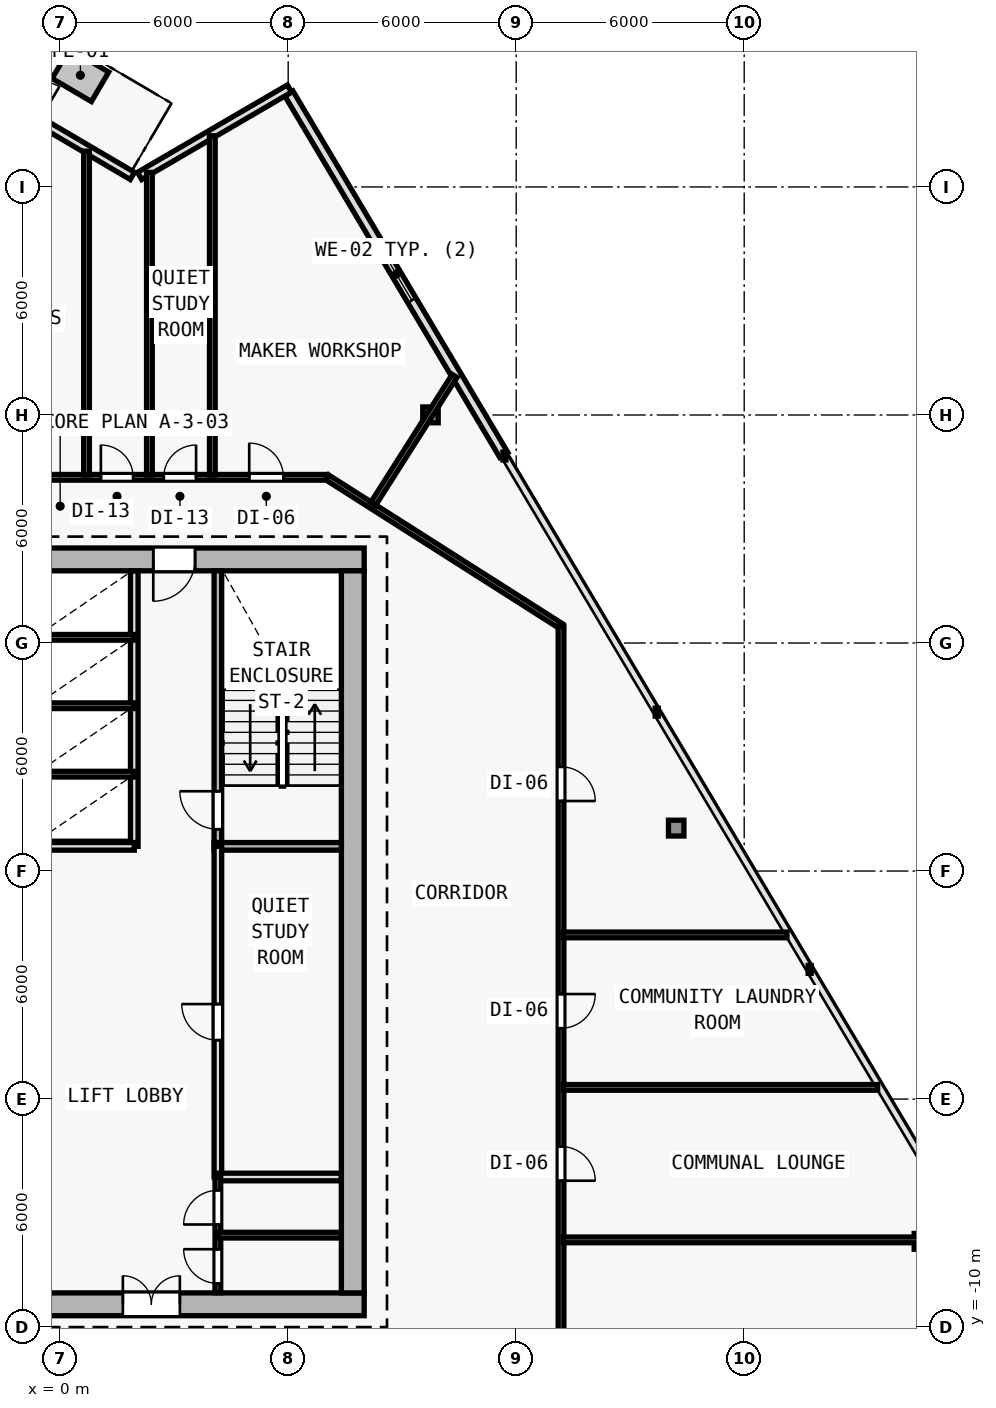
"""IFC4 building model, lengths in metres.
Left out: names, types, materials, properties, quantities, classifications, styles, units other than length and angle.
Written with IfcOpenShell. Run it as: python <this file> out.ifc"""

import sys

from ifc_helpers import new_model, si_unit, direction, frame, frame_2d, origin, origin_2d, place, context, subcontext, project, spatial, rectangle, i_section, extrude, element, fill, save


model = new_model("IFC4")
c1 = context("Model", 3, precision=1e-05, world=origin(), true_north=direction((0.0, 1.0)))
c2 = subcontext(c1, "Body", "Model", "MODEL_VIEW")
j1 = project(units=[si_unit("LENGTHUNIT", "METRE"), si_unit("PLANEANGLEUNIT", "RADIAN")], contexts=[c1])
p1 = place(None, origin())
s1 = spatial("IfcSite", under=j1, at=p1, CompositionType="ELEMENT")
p2 = place(p1, origin())
s2 = spatial("IfcBuilding", under=s1, at=p2, CompositionType="ELEMENT")
p3 = place(p2, frame((0.0, 0.0, 125.7)))
s3 = spatial("IfcBuildingStorey", under=s2, at=p3, CompositionType="ELEMENT", Elevation=125.7)
for number, where, z_axis, x_axis in (
    (1, (7.7, -9.4, 0.0), (0.0, 0.0, 1.0), (1.0, 0.0, 0.0)),
    (2, (7.7, 10.2, 0.0), (0.0, 0.0, 1.0), (1.0, 0.0, 0.0)),
    (3, (0.0, -9.4, 0.0), (0.0, 0.0, 1.0), (1.0, 0.0, 0.0)),
    (4, (7.7, 0.4, 0.0), (0.0, 0.0, 1.0), (1.0, 0.0, 0.0)),
):
    element("IfcColumn", number, at=place(p3, frame(where, z_axis=z_axis, x_axis=x_axis)), inside=s3, PredefinedType="COLUMN", context=c2, shape_type="SweptSolid", body=[
        extrude(i_section(OverallWidth=0.409, OverallDepth=0.425, WebThickness=0.021, FlangeThickness=0.034, FilletRadius=0.015, at=origin_2d()), origin(), (0.0, 0.0, 1.0), 3.6),
    ])
p4 = place(p3, frame((22.676, -7.743, 0.006), z_axis=(-0.026107436898, 0.021620221181, 0.999425318758), x_axis=(-0.637813971185, -0.770190455771, 0.0)))
e5 = element("IfcColumn", 5, at=p4, inside=s3, PredefinedType="COLUMN", context=c2, shape_type="SweptSolid", body=[
    extrude(i_section(OverallWidth=0.406, OverallDepth=0.416, WebThickness=0.019, FlangeThickness=0.031, FilletRadius=0.015, at=origin_2d()), origin(), (0.0, 0.0, 1.0), 3.591),
])
p5 = place(p3, frame((16.21, 3.13, 0.006), z_axis=(-0.018907326549, 0.00952167524, 0.999775900241), x_axis=(-0.449781931574, -0.893138406984, 0.0)))
e6 = element("IfcColumn", 6, at=p5, inside=s3, PredefinedType="COLUMN", context=c2, shape_type="SweptSolid", body=[
    extrude(i_section(OverallWidth=0.406, OverallDepth=0.416, WebThickness=0.019, FlangeThickness=0.031, FilletRadius=0.015, at=origin_2d()), origin(), (0.0, 0.0, 1.0), 3.59),
])
p6 = place(p3, frame((9.744, 14.003, 0.006), z_axis=(-0.011699842352, -0.002516826552, 0.999928387072), x_axis=(0.210305364179, -0.977635746993, 0.0)))
e7 = element("IfcColumn", 7, at=p6, inside=s3, PredefinedType="COLUMN", context=c2, shape_type="SweptSolid", body=[
    extrude(i_section(OverallWidth=0.406, OverallDepth=0.416, WebThickness=0.019, FlangeThickness=0.031, FilletRadius=0.015, at=origin_2d()), origin(), (0.0, 0.0, 1.0), 3.589),
])
p7 = place(p3, frame((6.017, 22.462, 0.0), z_axis=(0.0, 0.0, 1.0), x_axis=(0.511085523564, -0.859529864288, 0.0)))
e8 = element("IfcWall", 8, at=p7, inside=s3, PredefinedType="SOLIDWALL", context=c2, shape_type="SweptSolid", body=[
    extrude(rectangle(XDim=11.068, YDim=0.25, at=frame_2d((5.534, 0.0))), origin(), (0.0, 0.0, 1.0), 3.28),
])
p8 = place(p7, frame((4.734, 0.0, 0.62)))
e9 = element("IfcOpeningElement", 9, at=p8, cuts=e8, PredefinedType="OPENING", context=c2, shape_type="SweptSolid", body=[
    extrude(rectangle(XDim=1.6, YDim=2.1, at=frame_2d((0.8, 1.05))), frame((0.0, 0.135, 0.0), z_axis=(0.0, -1.0, 0.0), x_axis=(1.0, 0.0, 0.0)), (0.0, 0.0, 1.0), 0.27),
])
p9 = place(p3, frame((2.09, 20.291, 0.0), z_axis=(0.0, 0.0, 1.0), x_axis=(0.863978647835, 0.503528446153, 0.0)))
e10 = element("IfcWall", 10, at=p9, inside=s3, PredefinedType="SOLIDWALL", context=c2, shape_type="SweptSolid", body=[
    extrude(rectangle(XDim=4.564, YDim=0.22, at=frame_2d((2.282, 0.0))), origin(), (0.0, 0.0, 1.0), 3.28),
])
p10 = place(p3, frame((-2.447, 22.846, 0.0), z_axis=(0.0, 0.0, 1.0), x_axis=(0.8621357974, -0.506677280763, 0.0)))
e11 = element("IfcWall", 11, at=p10, inside=s3, PredefinedType="SOLIDWALL", context=c2, shape_type="SweptSolid", body=[
    extrude(rectangle(XDim=5.042, YDim=0.22, at=frame_2d((2.521, 0.0))), origin(), (0.0, 0.0, 1.0), 3.28),
])
p11 = place(p10, frame((1.146, 0.0, 0.0)))
e12 = element("IfcOpeningElement", 12, at=p11, cuts=e11, PredefinedType="OPENING", context=c2, shape_type="SweptSolid", body=[
    extrude(rectangle(XDim=1.05, YDim=2.15, at=frame_2d((0.525, 1.075))), frame((0.0, 0.12, 0.0), z_axis=(0.0, -1.0, 0.0), x_axis=(1.0, 0.0, 0.0)), (0.0, 0.0, 1.0), 0.24),
])
p12 = place(p3, frame((-8.0, -9.4, 0.0), z_axis=(0.0, 0.0, 1.0), x_axis=(1.0, 0.0, 0.0)))
e13 = element("IfcWall", 13, at=p12, inside=s3, PredefinedType="SHEAR", context=c2, shape_type="SweptSolid", body=[
    extrude(rectangle(XDim=16.0, YDim=0.6, at=frame_2d((8.0, 0.0))), origin(), (0.0, 0.0, 1.0), 3.28),
])
p13 = place(p12, frame((9.65, 0.0, 0.0)))
e14 = element("IfcOpeningElement", 14, at=p13, cuts=e13, PredefinedType="OPENING", context=c2, shape_type="SweptSolid", body=[
    extrude(rectangle(XDim=1.5, YDim=2.2, at=frame_2d((0.75, 1.1))), frame((0.0, 0.31, 0.0), z_axis=(0.0, -1.0, 0.0), x_axis=(1.0, 0.0, 0.0)), (0.0, 0.0, 1.0), 0.62),
])
p14 = place(p3, frame((8.0, 10.2, 0.0), z_axis=(0.0, 0.0, 1.0), x_axis=(-1.0, 0.0, 0.0)))
e15 = element("IfcWall", 15, at=p14, inside=s3, PredefinedType="SHEAR", context=c2, shape_type="SweptSolid", body=[
    extrude(rectangle(XDim=16.0, YDim=0.6, at=frame_2d((8.0, 0.0))), origin(), (0.0, 0.0, 1.0), 3.28),
])
p15 = place(p14, frame((4.45, 0.0, 0.0)))
e16 = element("IfcOpeningElement", 16, at=p15, cuts=e15, PredefinedType="OPENING", context=c2, shape_type="SweptSolid", body=[
    extrude(rectangle(XDim=1.1, YDim=2.15, at=frame_2d((0.55, 1.075))), frame((0.0, 0.31, 0.0), z_axis=(0.0, -1.0, 0.0), x_axis=(1.0, 0.0, 0.0)), (0.0, 0.0, 1.0), 0.62),
])
p16 = place(p3, frame((7.7, 9.9, 0.0), z_axis=(0.0, 0.0, 1.0), x_axis=(0.0, -1.0, 0.0)))
e17 = element("IfcWall", 17, at=p16, inside=s3, PredefinedType="SHEAR", context=c2, shape_type="SweptSolid", body=[
    extrude(rectangle(XDim=19.0, YDim=0.6, at=frame_2d((9.5, 0.0))), origin(), (0.0, 0.0, 1.0), 3.28),
])
p17 = place(p3, frame((4.15, 2.75, 0.0), z_axis=(0.0, 0.0, 1.0), x_axis=(0.0, 1.0, 0.0)))
e18 = element("IfcWall", 18, at=p17, inside=s3, PredefinedType="SOLIDWALL", context=c2, shape_type="SweptSolid", body=[
    extrude(rectangle(XDim=7.15, YDim=0.2, at=frame_2d((3.575, 0.0))), origin(), (0.0, 0.0, 1.0), 3.28),
])
p18 = place(p17, frame((0.35, 0.0, 0.0)))
e19 = element("IfcOpeningElement", 19, at=p18, cuts=e18, PredefinedType="OPENING", context=c2, shape_type="SweptSolid", body=[
    extrude(rectangle(XDim=1.0, YDim=2.15, at=frame_2d((0.5, 1.075))), frame((0.0, 0.11, 0.0), z_axis=(0.0, -1.0, 0.0), x_axis=(1.0, 0.0, 0.0)), (0.0, 0.0, 1.0), 0.22),
])
p19 = place(p3, frame((4.05, 2.65, 0.0), z_axis=(0.0, 0.0, 1.0), x_axis=(1.0, 0.0, 0.0)))
e20 = element("IfcWall", 20, at=p19, inside=s3, PredefinedType="SOLIDWALL", context=c2, shape_type="SweptSolid", body=[
    extrude(rectangle(XDim=3.35, YDim=0.2, at=frame_2d((1.675, 0.0))), origin(), (0.0, 0.0, 1.0), 3.28),
])
p20 = place(p3, frame((4.15, -6.05, 0.0), z_axis=(0.0, 0.0, 1.0), x_axis=(0.0, 1.0, 0.0)))
e21 = element("IfcWall", 21, at=p20, inside=s3, PredefinedType="SOLIDWALL", context=c2, shape_type="SweptSolid", body=[
    extrude(rectangle(XDim=8.7, YDim=0.2, at=frame_2d((4.35, 0.0))), origin(), (0.0, 0.0, 1.0), 3.28),
])
p21 = place(p20, frame((3.6, 0.0, 0.0)))
e22 = element("IfcOpeningElement", 22, at=p21, cuts=e21, PredefinedType="OPENING", context=c2, shape_type="SweptSolid", body=[
    extrude(rectangle(XDim=0.95, YDim=2.1, at=frame_2d((0.475, 1.05))), frame((0.0, 0.11, 0.0), z_axis=(0.0, -1.0, 0.0), x_axis=(1.0, 0.0, 0.0)), (0.0, 0.0, 1.0), 0.22),
])
p22 = place(p3, frame((1.95, 2.65, 0.0), z_axis=(0.0, 0.0, 1.0), x_axis=(0.0, 1.0, 0.0)))
e23 = element("IfcWall", 23, at=p22, inside=s3, PredefinedType="SOLIDWALL", context=c2, shape_type="SweptSolid", body=[
    extrude(rectangle(XDim=7.245, YDim=0.2, at=frame_2d((3.623, 0.0))), origin(), (0.0, 0.0, 1.0), 3.28),
])
p23 = place(p3, frame((-0.95, 2.65, 0.0), z_axis=(0.0, 0.0, 1.0), x_axis=(1.0, 0.0, 0.0)))
e24 = element("IfcWall", 24, at=p23, inside=s3, PredefinedType="SOLIDWALL", context=c2, shape_type="SweptSolid", body=[
    extrude(rectangle(XDim=2.9, YDim=0.2, at=frame_2d((1.45, 0.0))), origin(), (0.0, 0.0, 1.0), 3.28),
])
for number, where, z_axis, x_axis in (
    (25, (-0.75, 4.55, 0.0), (0.0, 0.0, 1.0), (1.0, 0.0, 0.0)),
    (26, (-0.75, 6.35, 0.0), (0.0, 0.0, 1.0), (1.0, 0.0, 0.0)),
    (27, (-0.75, 8.15, 0.0), (0.0, 0.0, 1.0), (1.0, 0.0, 0.0)),
):
    element("IfcWall", number, at=place(p3, frame(where, z_axis=z_axis, x_axis=x_axis)), inside=s3, PredefinedType="PARTITIONING", context=c2, shape_type="SweptSolid", body=[
        extrude(rectangle(XDim=2.7, YDim=0.15, at=frame_2d((1.35, 0.0))), origin(), (0.0, 0.0, 1.0), 3.28),
    ])
p24 = place(p3, frame((4.15, -6.05, 0.0), z_axis=(0.0, 0.0, 1.0), x_axis=(1.0, 0.0, 0.0)))
e28 = element("IfcWall", 28, at=p24, inside=s3, PredefinedType="SOLIDWALL", context=c2, shape_type="SweptSolid", body=[
    extrude(rectangle(XDim=3.245, YDim=0.2, at=frame_2d((1.623, 0.0))), origin(), (0.0, 0.0, 1.0), 3.28),
])
p25 = place(p3, frame((4.15, -9.095, 0.0), z_axis=(0.0, 0.0, 1.0), x_axis=(0.0, 1.0, 0.0)))
e29 = element("IfcWall", 29, at=p25, inside=s3, PredefinedType="PARTITIONING", context=c2, shape_type="SweptSolid", body=[
    extrude(rectangle(XDim=3.045, YDim=0.15, at=frame_2d((1.522, 0.0))), origin(), (0.0, 0.0, 1.0), 3.28),
])
p26 = place(p25, frame((0.245, 0.0, 0.0)))
e30 = element("IfcOpeningElement", 30, at=p26, cuts=e29, PredefinedType="OPENING", context=c2, shape_type="SweptSolid", body=[
    extrude(rectangle(XDim=0.9, YDim=2.1, at=frame_2d((0.45, 1.05))), frame((0.0, 0.085, 0.0), z_axis=(0.0, -1.0, 0.0), x_axis=(1.0, 0.0, 0.0)), (0.0, 0.0, 1.0), 0.17),
])
p27 = place(p25, frame((1.795, 0.0, 0.0)))
e31 = element("IfcOpeningElement", 31, at=p27, cuts=e29, PredefinedType="OPENING", context=c2, shape_type="SweptSolid", body=[
    extrude(rectangle(XDim=0.9, YDim=2.1, at=frame_2d((0.45, 1.05))), frame((0.0, 0.085, 0.0), z_axis=(0.0, -1.0, 0.0), x_axis=(1.0, 0.0, 0.0)), (0.0, 0.0, 1.0), 0.17),
])
p28 = place(p3, frame((4.15, -7.58, 0.0), z_axis=(0.0, 0.0, 1.0), x_axis=(1.0, 0.0, 0.0)))
e32 = element("IfcWall", 32, at=p28, inside=s3, PredefinedType="PARTITIONING", context=c2, shape_type="SweptSolid", body=[
    extrude(rectangle(XDim=3.245, YDim=0.15, at=frame_2d((1.623, 0.0))), origin(), (0.0, 0.0, 1.0), 3.28),
])
p29 = place(p3, frame((-7.041, 12.36, 0.0), z_axis=(0.0, 0.0, 1.0), x_axis=(1.0, 0.0, 0.0)))
e33 = element("IfcWall", 33, at=p29, inside=s3, PredefinedType="PARTITIONING", context=c2, shape_type="SweptSolid", body=[
    extrude(rectangle(XDim=14.064, YDim=0.15, at=frame_2d((7.032, 0.0))), origin(), (0.0, 0.0, 1.0), 3.28),
])
p30 = place(p29, frame((12.016, 0.0, 0.0)))
e34 = element("IfcOpeningElement", 34, at=p30, cuts=e33, PredefinedType="OPENING", context=c2, shape_type="SweptSolid", body=[
    extrude(rectangle(XDim=0.9, YDim=2.1, at=frame_2d((0.45, 1.05))), frame((0.0, 0.085, 0.0), z_axis=(0.0, -1.0, 0.0), x_axis=(1.0, 0.0, 0.0)), (0.0, 0.0, 1.0), 0.17),
])
p31 = place(p29, frame((9.767, 0.0, 0.0)))
e35 = element("IfcOpeningElement", 35, at=p31, cuts=e33, PredefinedType="OPENING", context=c2, shape_type="SweptSolid", body=[
    extrude(rectangle(XDim=0.85, YDim=2.1, at=frame_2d((0.425, 1.05))), frame((0.0, 0.085, 0.0), z_axis=(0.0, -1.0, 0.0), x_axis=(1.0, 0.0, 0.0)), (0.0, 0.0, 1.0), 0.17),
])
p32 = place(p29, frame((8.112, 0.0, 0.0)))
e36 = element("IfcOpeningElement", 36, at=p32, cuts=e33, PredefinedType="OPENING", context=c2, shape_type="SweptSolid", body=[
    extrude(rectangle(XDim=0.85, YDim=2.1, at=frame_2d((0.425, 1.05))), frame((0.0, 0.085, 0.0), z_axis=(0.0, -1.0, 0.0), x_axis=(1.0, 0.0, 0.0)), (0.0, 0.0, 1.0), 0.17),
])
p33 = place(p29, frame((3.506, 0.0, 0.0)))
e37 = element("IfcOpeningElement", 37, at=p33, cuts=e33, PredefinedType="OPENING", context=c2, shape_type="SweptSolid", body=[
    extrude(rectangle(XDim=0.9, YDim=2.1, at=frame_2d((0.45, 1.05))), frame((0.0, 0.085, 0.0), z_axis=(0.0, -1.0, 0.0), x_axis=(1.0, 0.0, 0.0)), (0.0, 0.0, 1.0), 0.17),
])
p34 = place(p3, frame((7.023, 12.36, 0.0), z_axis=(0.0, 0.0, 1.0), x_axis=(0.84376480085, -0.536713108511, 0.0)))
e38 = element("IfcWall", 38, at=p34, inside=s3, PredefinedType="PARTITIONING", context=c2, shape_type="SweptSolid", body=[
    extrude(rectangle(XDim=7.297, YDim=0.15, at=frame_2d((3.648, 0.0))), origin(), (0.0, 0.0, 1.0), 2.815),
])
p35 = place(p3, frame((13.18, 8.444, 0.0), z_axis=(0.0, 0.0, 1.0), x_axis=(0.0, -1.0, 0.0)))
e39 = element("IfcWall", 39, at=p35, inside=s3, PredefinedType="PARTITIONING", context=c2, shape_type="SweptSolid", body=[
    extrude(rectangle(XDim=20.004, YDim=0.15, at=frame_2d((10.002, 0.0))), origin(), (0.0, 0.0, 1.0), 2.635),
])
p36 = place(p35, frame((13.692, 0.0, 0.0)))
e40 = element("IfcOpeningElement", 40, at=p36, cuts=e39, PredefinedType="OPENING", context=c2, shape_type="SweptSolid", body=[
    extrude(rectangle(XDim=0.9, YDim=2.1, at=frame_2d((0.45, 1.05))), frame((0.0, 0.085, 0.0), z_axis=(0.0, -1.0, 0.0), x_axis=(1.0, 0.0, 0.0)), (0.0, 0.0, 1.0), 0.17),
])
p37 = place(p35, frame((9.68, 0.0, 0.0)))
e41 = element("IfcOpeningElement", 41, at=p37, cuts=e39, PredefinedType="OPENING", context=c2, shape_type="SweptSolid", body=[
    extrude(rectangle(XDim=0.9, YDim=2.1, at=frame_2d((0.45, 1.05))), frame((0.0, 0.085, 0.0), z_axis=(0.0, -1.0, 0.0), x_axis=(1.0, 0.0, 0.0)), (0.0, 0.0, 1.0), 0.17),
])
p38 = place(p35, frame((3.701, 0.0, 0.0)))
e42 = element("IfcOpeningElement", 42, at=p38, cuts=e39, PredefinedType="OPENING", context=c2, shape_type="SweptSolid", body=[
    extrude(rectangle(XDim=0.9, YDim=2.1, at=frame_2d((0.45, 1.05))), frame((0.0, 0.085, 0.0), z_axis=(0.0, -1.0, 0.0), x_axis=(1.0, 0.0, 0.0)), (0.0, 0.0, 1.0), 0.17),
])
p39 = place(p3, frame((13.24, -7.705, 0.0), z_axis=(0.0, 0.0, 1.0), x_axis=(1.0, 0.0, 0.0)))
e43 = element("IfcWall", 43, at=p39, inside=s3, PredefinedType="PARTITIONING", context=c2, shape_type="SweptSolid", body=[
    extrude(rectangle(XDim=10.657, YDim=0.15, at=frame_2d((5.328, 0.0))), origin(), (0.0, 0.0, 1.0), 2.635),
])
p40 = place(p3, frame((8.236, 11.66, 0.0), z_axis=(0.0, 0.0, 1.0), x_axis=(0.536709317905, 0.843767212017, 0.0)))
e44 = element("IfcWall", 44, at=p40, inside=s3, PredefinedType="PARTITIONING", context=c2, shape_type="SweptSolid", body=[
    extrude(rectangle(XDim=3.993, YDim=0.15, at=frame_2d((1.997, 0.0))), origin(), (0.0, 0.0, 1.0), 2.815),
])
p41 = place(p3, frame((0.693, 12.42, 0.0), z_axis=(0.0, 0.0, 1.0), x_axis=(0.0, 1.0, 0.0)))
e45 = element("IfcWall", 45, at=p41, inside=s3, PredefinedType="PARTITIONING", context=c2, shape_type="SweptSolid", body=[
    extrude(rectangle(XDim=8.522, YDim=0.15, at=frame_2d((4.261, 0.0))), origin(), (0.0, 0.0, 1.0), 2.815),
])
p42 = place(p3, frame((13.24, 0.32, 0.0), z_axis=(0.0, 0.0, 1.0), x_axis=(1.0, 0.0, 0.0)))
e46 = element("IfcWall", 46, at=p42, inside=s3, PredefinedType="PARTITIONING", context=c2, shape_type="SweptSolid", body=[
    extrude(rectangle(XDim=5.885, YDim=0.15, at=frame_2d((2.943, 0.0))), origin(), (0.0, 0.0, 1.0), 2.805),
])
p43 = place(p3, frame((4.004, 12.42, 0.0), z_axis=(0.0, 0.0, 1.0), x_axis=(0.0, 1.0, 0.0)))
e47 = element("IfcWall", 47, at=p43, inside=s3, PredefinedType="PARTITIONING", context=c2, shape_type="SweptSolid", body=[
    extrude(rectangle(XDim=8.928, YDim=0.15, at=frame_2d((4.464, 0.0))), origin(), (0.0, 0.0, 1.0), 2.815),
])
p44 = place(p3, frame((2.349, 12.42, 0.0), z_axis=(0.0, 0.0, 1.0), x_axis=(0.0, 1.0, 0.0)))
e48 = element("IfcWall", 48, at=p44, inside=s3, PredefinedType="PARTITIONING", context=c2, shape_type="SweptSolid", body=[
    extrude(rectangle(XDim=7.963, YDim=0.15, at=frame_2d((3.982, 0.0))), origin(), (0.0, 0.0, 1.0), 2.815),
])
p45 = place(p3, frame((13.24, -3.692, 0.0), z_axis=(0.0, 0.0, 1.0), x_axis=(1.0, 0.0, 0.0)))
e49 = element("IfcWall", 49, at=p45, inside=s3, PredefinedType="PARTITIONING", context=c2, shape_type="SweptSolid", body=[
    extrude(rectangle(XDim=8.271, YDim=0.15, at=frame_2d((4.135, 0.0))), origin(), (0.0, 0.0, 1.0), 2.805),
])
p46 = place(p8, origin())
e50 = element("IfcWindow", 50, at=p46, inside=s3, PartitioningType="SINGLE_PANEL", PredefinedType="WINDOW", context=c2, shape_type="SweptSolid", body=[
    extrude(rectangle(XDim=1.6, YDim=2.1, at=frame_2d((0.8, 1.05))), frame((0.0, 0.03, 0.0), z_axis=(0.0, -1.0, 0.0), x_axis=(1.0, 0.0, 0.0)), (0.0, 0.0, 1.0), 0.06),
])
fill(e9, e50)
p47 = place(p13, origin())
e51 = element("IfcDoor", 51, at=p47, inside=s3, OperationType="DOUBLE_DOOR_SINGLE_SWING", PredefinedType="DOOR", context=c2, shape_type="SweptSolid", body=[
    extrude(rectangle(XDim=1.5, YDim=2.2, at=frame_2d((0.75, 1.1))), frame((0.0, 0.025, 0.0), z_axis=(0.0, -1.0, 0.0), x_axis=(1.0, 0.0, 0.0)), (0.0, 0.0, 1.0), 0.05),
])
fill(e14, e51)
p48 = place(p15, origin())
e52 = element("IfcDoor", 52, at=p48, inside=s3, OperationType="SINGLE_SWING_RIGHT", PredefinedType="DOOR", context=c2, shape_type="SweptSolid", body=[
    extrude(rectangle(XDim=1.1, YDim=2.15, at=frame_2d((0.55, 1.075))), frame((0.0, 0.025, 0.0), z_axis=(0.0, -1.0, 0.0), x_axis=(1.0, 0.0, 0.0)), (0.0, 0.0, 1.0), 0.05),
])
fill(e16, e52)
p49 = place(p18, origin())
e53 = element("IfcDoor", 53, at=p49, inside=s3, OperationType="SINGLE_SWING_RIGHT", PredefinedType="DOOR", context=c2, shape_type="SweptSolid", body=[
    extrude(rectangle(XDim=1.0, YDim=2.15, at=frame_2d((0.5, 1.075))), frame((0.0, 0.025, 0.0), z_axis=(0.0, -1.0, 0.0), x_axis=(1.0, 0.0, 0.0)), (0.0, 0.0, 1.0), 0.05),
])
fill(e19, e53)
p50 = place(p21, origin())
e54 = element("IfcDoor", 54, at=p50, inside=s3, OperationType="SINGLE_SWING_RIGHT", PredefinedType="DOOR", context=c2, shape_type="SweptSolid", body=[
    extrude(rectangle(XDim=0.95, YDim=2.1, at=frame_2d((0.475, 1.05))), frame((0.0, 0.025, 0.0), z_axis=(0.0, -1.0, 0.0), x_axis=(1.0, 0.0, 0.0)), (0.0, 0.0, 1.0), 0.05),
])
fill(e22, e54)
p51 = place(p26, origin())
e55 = element("IfcDoor", 55, at=p51, inside=s3, OperationType="SINGLE_SWING_RIGHT", PredefinedType="DOOR", context=c2, shape_type="SweptSolid", body=[
    extrude(rectangle(XDim=0.9, YDim=2.1, at=frame_2d((0.45, 1.05))), frame((0.0, 0.025, 0.0), z_axis=(0.0, -1.0, 0.0), x_axis=(1.0, 0.0, 0.0)), (0.0, 0.0, 1.0), 0.05),
])
fill(e30, e55)
p52 = place(p27, origin())
e56 = element("IfcDoor", 56, at=p52, inside=s3, OperationType="SINGLE_SWING_LEFT", PredefinedType="DOOR", context=c2, shape_type="SweptSolid", body=[
    extrude(rectangle(XDim=0.9, YDim=2.1, at=frame_2d((0.45, 1.05))), frame((0.0, 0.025, 0.0), z_axis=(0.0, -1.0, 0.0), x_axis=(1.0, 0.0, 0.0)), (0.0, 0.0, 1.0), 0.05),
])
fill(e31, e56)
p53 = place(p36, origin())
e57 = element("IfcDoor", 57, at=p53, inside=s3, OperationType="SINGLE_SWING_RIGHT", PredefinedType="DOOR", context=c2, shape_type="SweptSolid", body=[
    extrude(rectangle(XDim=0.9, YDim=2.1, at=frame_2d((0.45, 1.05))), frame((0.0, 0.025, 0.0), z_axis=(0.0, -1.0, 0.0), x_axis=(1.0, 0.0, 0.0)), (0.0, 0.0, 1.0), 0.05),
])
fill(e40, e57)
p54 = place(p37, origin())
e58 = element("IfcDoor", 58, at=p54, inside=s3, OperationType="SINGLE_SWING_LEFT", PredefinedType="DOOR", context=c2, shape_type="SweptSolid", body=[
    extrude(rectangle(XDim=0.9, YDim=2.1, at=frame_2d((0.45, 1.05))), frame((0.0, 0.025, 0.0), z_axis=(0.0, -1.0, 0.0), x_axis=(1.0, 0.0, 0.0)), (0.0, 0.0, 1.0), 0.05),
])
fill(e41, e58)
p55 = place(p38, origin())
e59 = element("IfcDoor", 59, at=p55, inside=s3, OperationType="SINGLE_SWING_RIGHT", PredefinedType="DOOR", context=c2, shape_type="SweptSolid", body=[
    extrude(rectangle(XDim=0.9, YDim=2.1, at=frame_2d((0.45, 1.05))), frame((0.0, 0.025, 0.0), z_axis=(0.0, -1.0, 0.0), x_axis=(1.0, 0.0, 0.0)), (0.0, 0.0, 1.0), 0.05),
])
fill(e42, e59)
p56 = place(p30, origin())
e60 = element("IfcDoor", 60, at=p56, inside=s3, OperationType="SINGLE_SWING_LEFT", PredefinedType="DOOR", context=c2, shape_type="SweptSolid", body=[
    extrude(rectangle(XDim=0.9, YDim=2.1, at=frame_2d((0.45, 1.05))), frame((0.0, 0.025, 0.0), z_axis=(0.0, -1.0, 0.0), x_axis=(1.0, 0.0, 0.0)), (0.0, 0.0, 1.0), 0.05),
])
fill(e34, e60)
p57 = place(p31, origin())
e61 = element("IfcDoor", 61, at=p57, inside=s3, OperationType="SINGLE_SWING_RIGHT", PredefinedType="DOOR", context=c2, shape_type="SweptSolid", body=[
    extrude(rectangle(XDim=0.85, YDim=2.1, at=frame_2d((0.425, 1.05))), frame((0.0, 0.025, 0.0), z_axis=(0.0, -1.0, 0.0), x_axis=(1.0, 0.0, 0.0)), (0.0, 0.0, 1.0), 0.05),
])
fill(e35, e61)
p58 = place(p32, origin())
e62 = element("IfcDoor", 62, at=p58, inside=s3, OperationType="SINGLE_SWING_LEFT", PredefinedType="DOOR", context=c2, shape_type="SweptSolid", body=[
    extrude(rectangle(XDim=0.85, YDim=2.1, at=frame_2d((0.425, 1.05))), frame((0.0, 0.025, 0.0), z_axis=(0.0, -1.0, 0.0), x_axis=(1.0, 0.0, 0.0)), (0.0, 0.0, 1.0), 0.05),
])
fill(e36, e62)
save(model, sys.argv[1])
